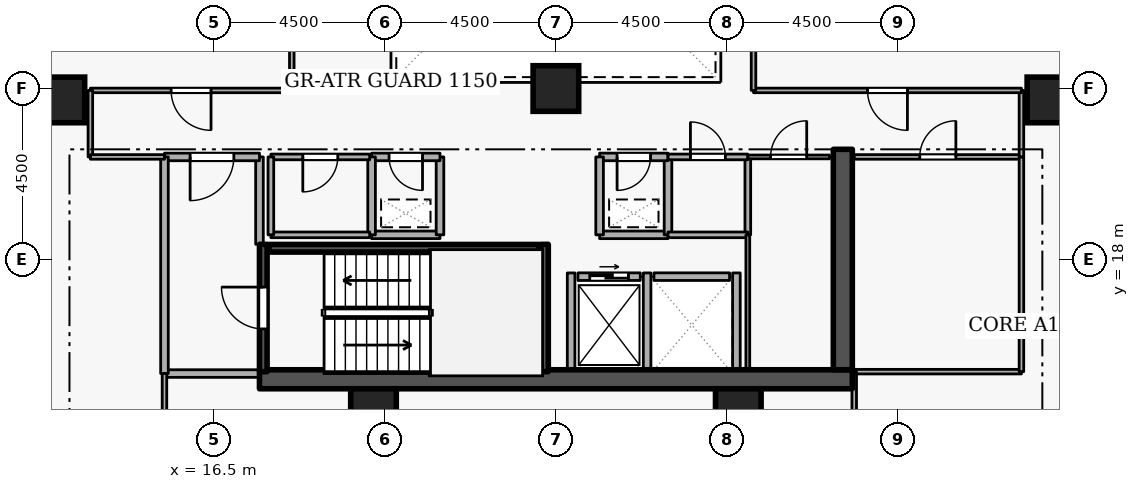
"""IFC4 building model, lengths in metres.
Left out: names, types, materials, properties, quantities, classifications, styles, units other than length and angle.
Written with IfcOpenShell. Run it as: python <this file> out.ifc"""

import sys

from ifc_helpers import new_model, si_unit, direction, frame, frame_2d, origin, origin_2d, place, context, subcontext, project, spatial, rectangle, extrude, element, fill, save


model = new_model("IFC4")
c1 = context("Model", 3, precision=1e-05, world=origin(), true_north=direction((0.0, 1.0)))
c2 = subcontext(c1, "Body", "Model", "MODEL_VIEW")
j1 = project(units=[si_unit("LENGTHUNIT", "METRE"), si_unit("PLANEANGLEUNIT", "RADIAN")], contexts=[c1])
p1 = place(None, origin())
s1 = spatial("IfcSite", under=j1, at=p1, CompositionType="ELEMENT")
p2 = place(p1, origin())
s2 = spatial("IfcBuilding", under=s1, at=p2, CompositionType="ELEMENT")
p3 = place(p2, frame((0.0, 0.0, 123.3)))
s3 = spatial("IfcBuildingStorey", under=s2, at=p3, CompositionType="ELEMENT", Elevation=123.3)
p4 = place(p3, frame((17.7, 14.85, 0.0), z_axis=(0.0, 0.0, 1.0), x_axis=(1.0, 0.0, 0.0)))
e1 = element("IfcWall", 1, at=p4, inside=s3, PredefinedType="SHEAR", context=c2, shape_type="SweptSolid", body=[
    extrude(rectangle(XDim=15.6, YDim=0.5, at=frame_2d((7.8, 0.0))), origin(), (0.0, 0.0, 1.0), 3.6),
])
p5 = place(p3, frame((33.05, 15.1, 0.0), z_axis=(0.0, 0.0, 1.0), x_axis=(0.0, 1.0, 0.0)))
e2 = element("IfcWall", 2, at=p5, inside=s3, PredefinedType="SHEAR", context=c2, shape_type="SweptSolid", body=[
    extrude(rectangle(XDim=5.8, YDim=0.5, at=frame_2d((2.9, 0.0))), origin(), (0.0, 0.0, 1.0), 3.6),
])
for number, where, z_axis, x_axis in (
    (3, (12.5, 22.2, 0.0), (0.0, 0.0, 1.0), (1.0, 0.0, 0.0)),
    (4, (38.5, 22.2, 0.0), (0.0, 0.0, 1.0), (1.0, 0.0, 0.0)),
    (5, (20.7, 14.0, 0.0), (0.0, 0.0, 1.0), (1.0, 0.0, 0.0)),
    (6, (30.3, 14.0, 0.0), (0.0, 0.0, 1.0), (1.0, 0.0, 0.0)),
    (7, (25.5, 22.5, 0.0), (0.0, 0.0, 1.0), (1.0, 0.0, 0.0)),
):
    element("IfcColumn", number, at=place(p3, frame(where, z_axis=z_axis, x_axis=x_axis)), inside=s3, PredefinedType="COLUMN", context=c2, shape_type="SweptSolid", body=[
        extrude(rectangle(XDim=1.2, YDim=1.2, at=origin_2d()), origin(), (0.0, 0.0, 1.0), 3.6),
    ])
p6 = place(p3, frame((26.08, 17.55, 0.0), z_axis=(0.0, 0.0, 1.0), x_axis=(1.0, 0.0, 0.0)))
e8 = element("IfcWall", 8, at=p6, inside=s3, PredefinedType="STANDARD", context=c2, shape_type="SweptSolid", body=[
    extrude(rectangle(XDim=1.64, YDim=0.2, at=frame_2d((0.82, 0.0))), origin(), (0.0, 0.0, 1.0), 3.34),
])
p7 = place(p6, frame((0.31, 0.0, 0.0)))
e9 = element("IfcOpeningElement", 9, at=p7, cuts=e8, PredefinedType="OPENING", context=c2, shape_type="SweptSolid", body=[
    extrude(rectangle(XDim=1.02, YDim=2.06, at=frame_2d((0.51, 1.03))), frame((0.0, 0.11, 0.0), z_axis=(0.0, -1.0, 0.0), x_axis=(1.0, 0.0, 0.0)), (0.0, 0.0, 1.0), 0.22),
])
p8 = place(p3, frame((28.08, 17.55, 0.0), z_axis=(0.0, 0.0, 1.0), x_axis=(1.0, 0.0, 0.0)))
e10 = element("IfcWall", 10, at=p8, inside=s3, PredefinedType="STANDARD", context=c2, shape_type="SweptSolid", body=[
    extrude(rectangle(XDim=1.99, YDim=0.2, at=frame_2d((0.995, 0.0))), origin(), (0.0, 0.0, 1.0), 3.34),
])
for number, where, z_axis, x_axis in (
    (11, (27.9, 15.112, 0.0), (0.0, 0.0, 1.0), (0.0, 1.0, 0.0)),
    (12, (25.9, 15.112, 0.0), (0.0, 0.0, 1.0), (0.0, 1.0, 0.0)),
    (13, (30.25, 15.112, 0.0), (0.0, 0.0, 1.0), (0.0, 1.0, 0.0)),
):
    element("IfcWall", number, at=place(p3, frame(where, z_axis=z_axis, x_axis=x_axis)), inside=s3, PredefinedType="STANDARD", context=c2, shape_type="SweptSolid", body=[
        extrude(rectangle(XDim=2.536, YDim=0.2, at=frame_2d((1.268, 0.0))), origin(), (0.0, 0.0, 1.0), 3.34),
    ])
p9 = place(p3, frame((17.8, 15.05, 0.0), z_axis=(0.0, 0.0, 1.0), x_axis=(0.0, 1.0, 0.0)))
e14 = element("IfcWall", 14, at=p9, inside=s3, PredefinedType="SHEAR", context=c2, shape_type="SweptSolid", body=[
    extrude(rectangle(XDim=3.35, YDim=0.2, at=frame_2d((1.675, 0.0))), origin(), (0.0, 0.0, 1.0), 3.6),
])
p10 = place(p9, frame((1.125, 0.0, 0.0)))
e15 = element("IfcOpeningElement", 15, at=p10, cuts=e14, PredefinedType="OPENING", context=c2, shape_type="SweptSolid", body=[
    extrude(rectangle(XDim=1.1, YDim=2.1, at=frame_2d((0.55, 1.05))), frame((0.0, 0.11, 0.0), z_axis=(0.0, -1.0, 0.0), x_axis=(1.0, 0.0, 0.0)), (0.0, 0.0, 1.0), 0.22),
])
p11 = place(p3, frame((25.2, 18.4, 0.0), z_axis=(0.0, 0.0, 1.0), x_axis=(0.0, -1.0, 0.0)))
e16 = element("IfcWall", 16, at=p11, inside=s3, PredefinedType="SHEAR", context=c2, shape_type="SweptSolid", body=[
    extrude(rectangle(XDim=3.35, YDim=0.2, at=frame_2d((1.675, 0.0))), origin(), (0.0, 0.0, 1.0), 3.6),
])
p12 = place(p3, frame((25.05, 18.297, 0.0), z_axis=(0.0, 0.0, 1.0), x_axis=(-1.0, 0.0, 0.0)))
e17 = element("IfcWall", 17, at=p12, inside=s3, PredefinedType="SHEAR", context=c2, shape_type="SweptSolid", body=[
    extrude(rectangle(XDim=7.1, YDim=0.2, at=frame_2d((3.55, 0.0))), origin(), (0.0, 0.0, 1.0), 3.6),
])
p13 = place(p3, frame((15.2, 15.0, 0.0), z_axis=(0.0, 0.0, 1.0), x_axis=(1.0, 0.0, 0.0)))
e18 = element("IfcWall", 18, at=p13, inside=s3, PredefinedType="STANDARD", context=c2, shape_type="SweptSolid", body=[
    extrude(rectangle(XDim=2.5, YDim=0.2, at=frame_2d((1.25, 0.0))), origin(), (0.0, 0.0, 1.0), 3.34),
])
p14 = place(p3, frame((17.7, 18.4, 0.0), z_axis=(0.0, 0.0, 1.0), x_axis=(0.0, 1.0, 0.0)))
e19 = element("IfcWall", 19, at=p14, inside=s3, PredefinedType="STANDARD", context=c2, shape_type="SweptSolid", body=[
    extrude(rectangle(XDim=2.3, YDim=0.2, at=frame_2d((1.15, 0.0))), origin(), (0.0, 0.0, 1.0), 2.545),
])
p15 = place(p3, frame((17.7, 20.7, 0.0), z_axis=(0.0, 0.0, 1.0), x_axis=(-1.0, 0.0, 0.0)))
e20 = element("IfcWall", 20, at=p15, inside=s3, PredefinedType="STANDARD", context=c2, shape_type="SweptSolid", body=[
    extrude(rectangle(XDim=2.5, YDim=0.2, at=frame_2d((1.25, 0.0))), origin(), (0.0, 0.0, 1.0), 3.34),
])
p16 = place(p15, frame((0.675, 0.0, 0.0)))
e21 = element("IfcOpeningElement", 21, at=p16, cuts=e20, PredefinedType="OPENING", context=c2, shape_type="SweptSolid", body=[
    extrude(rectangle(XDim=1.15, YDim=2.1, at=frame_2d((0.575, 1.05))), frame((0.0, 0.11, 0.0), z_axis=(0.0, -1.0, 0.0), x_axis=(1.0, 0.0, 0.0)), (0.0, 0.0, 1.0), 0.22),
])
p17 = place(p3, frame((15.2, 20.7, 0.0), z_axis=(0.0, 0.0, 1.0), x_axis=(0.0, -1.0, 0.0)))
e22 = element("IfcWall", 22, at=p17, inside=s3, PredefinedType="STANDARD", context=c2, shape_type="SweptSolid", body=[
    extrude(rectangle(XDim=5.7, YDim=0.2, at=frame_2d((2.85, 0.0))), origin(), (0.0, 0.0, 1.0), 3.34),
])
p18 = place(p3, frame((26.65, 18.65, 0.0), z_axis=(0.0, 0.0, 1.0), x_axis=(1.0, 0.0, 0.0)))
e23 = element("IfcWall", 23, at=p18, inside=s3, PredefinedType="STANDARD", context=c2, shape_type="SweptSolid", body=[
    extrude(rectangle(XDim=1.8, YDim=0.2, at=frame_2d((0.9, 0.0))), origin(), (0.0, 0.0, 1.0), 3.34),
])
p19 = place(p3, frame((28.45, 18.65, 0.0), z_axis=(0.0, 0.0, 1.0), x_axis=(0.0, 1.0, 0.0)))
e24 = element("IfcWall", 24, at=p19, inside=s3, PredefinedType="STANDARD", context=c2, shape_type="SweptSolid", body=[
    extrude(rectangle(XDim=2.05, YDim=0.2, at=frame_2d((1.025, 0.0))), origin(), (0.0, 0.0, 1.0), 3.34),
])
p20 = place(p3, frame((28.45, 20.7, 0.0), z_axis=(0.0, 0.0, 1.0), x_axis=(-1.0, 0.0, 0.0)))
e25 = element("IfcWall", 25, at=p20, inside=s3, PredefinedType="STANDARD", context=c2, shape_type="SweptSolid", body=[
    extrude(rectangle(XDim=1.8, YDim=0.2, at=frame_2d((0.9, 0.0))), origin(), (0.0, 0.0, 1.0), 3.34),
])
p21 = place(p20, frame((0.46, 0.0, 0.0)))
e26 = element("IfcOpeningElement", 26, at=p21, cuts=e25, PredefinedType="OPENING", context=c2, shape_type="SweptSolid", body=[
    extrude(rectangle(XDim=0.88, YDim=2.04, at=frame_2d((0.44, 1.02))), frame((0.0, 0.11, 0.0), z_axis=(0.0, -1.0, 0.0), x_axis=(1.0, 0.0, 0.0)), (0.0, 0.0, 1.0), 0.22),
])
p22 = place(p3, frame((26.65, 20.7, 0.0), z_axis=(0.0, 0.0, 1.0), x_axis=(0.0, -1.0, 0.0)))
e27 = element("IfcWall", 27, at=p22, inside=s3, PredefinedType="STANDARD", context=c2, shape_type="SweptSolid", body=[
    extrude(rectangle(XDim=2.05, YDim=0.2, at=frame_2d((1.025, 0.0))), origin(), (0.0, 0.0, 1.0), 3.34),
])
p23 = place(p3, frame((20.65, 18.65, 0.0), z_axis=(0.0, 0.0, 1.0), x_axis=(1.0, 0.0, 0.0)))
e28 = element("IfcWall", 28, at=p23, inside=s3, PredefinedType="STANDARD", context=c2, shape_type="SweptSolid", body=[
    extrude(rectangle(XDim=1.8, YDim=0.2, at=frame_2d((0.9, 0.0))), origin(), (0.0, 0.0, 1.0), 3.34),
])
p24 = place(p3, frame((22.45, 18.65, 0.0), z_axis=(0.0, 0.0, 1.0), x_axis=(0.0, 1.0, 0.0)))
e29 = element("IfcWall", 29, at=p24, inside=s3, PredefinedType="STANDARD", context=c2, shape_type="SweptSolid", body=[
    extrude(rectangle(XDim=2.05, YDim=0.2, at=frame_2d((1.025, 0.0))), origin(), (0.0, 0.0, 1.0), 3.34),
])
p25 = place(p3, frame((22.45, 20.7, 0.0), z_axis=(0.0, 0.0, 1.0), x_axis=(-1.0, 0.0, 0.0)))
e30 = element("IfcWall", 30, at=p25, inside=s3, PredefinedType="STANDARD", context=c2, shape_type="SweptSolid", body=[
    extrude(rectangle(XDim=1.8, YDim=0.2, at=frame_2d((0.9, 0.0))), origin(), (0.0, 0.0, 1.0), 3.34),
])
p26 = place(p25, frame((0.46, 0.0, 0.0)))
e31 = element("IfcOpeningElement", 31, at=p26, cuts=e30, PredefinedType="OPENING", context=c2, shape_type="SweptSolid", body=[
    extrude(rectangle(XDim=0.88, YDim=2.04, at=frame_2d((0.44, 1.02))), frame((0.0, 0.11, 0.0), z_axis=(0.0, -1.0, 0.0), x_axis=(1.0, 0.0, 0.0)), (0.0, 0.0, 1.0), 0.22),
])
p27 = place(p3, frame((20.65, 20.7, 0.0), z_axis=(0.0, 0.0, 1.0), x_axis=(0.0, -1.0, 0.0)))
e32 = element("IfcWall", 32, at=p27, inside=s3, PredefinedType="STANDARD", context=c2, shape_type="SweptSolid", body=[
    extrude(rectangle(XDim=2.05, YDim=0.2, at=frame_2d((1.025, 0.0))), origin(), (0.0, 0.0, 1.0), 3.34),
])
p28 = place(p3, frame((18.0, 18.65, 0.0), z_axis=(0.0, 0.0, 1.0), x_axis=(1.0, 0.0, 0.0)))
e33 = element("IfcWall", 33, at=p28, inside=s3, PredefinedType="PARTITIONING", context=c2, shape_type="SweptSolid", body=[
    extrude(rectangle(XDim=2.6, YDim=0.15, at=frame_2d((1.3, 0.0))), origin(), (0.0, 0.0, 1.0), 3.34),
])
p29 = place(p3, frame((20.6, 20.7, 0.0), z_axis=(0.0, 0.0, 1.0), x_axis=(-1.0, 0.0, 0.0)))
e34 = element("IfcWall", 34, at=p29, inside=s3, PredefinedType="PARTITIONING", context=c2, shape_type="SweptSolid", body=[
    extrude(rectangle(XDim=2.6, YDim=0.15, at=frame_2d((1.3, 0.0))), origin(), (0.0, 0.0, 1.0), 3.34),
])
p30 = place(p29, frame((0.84, 0.0, 0.0)))
e35 = element("IfcOpeningElement", 35, at=p30, cuts=e34, PredefinedType="OPENING", context=c2, shape_type="SweptSolid", body=[
    extrude(rectangle(XDim=0.92, YDim=2.08, at=frame_2d((0.46, 1.04))), frame((0.0, 0.085, 0.0), z_axis=(0.0, -1.0, 0.0), x_axis=(1.0, 0.0, 0.0)), (0.0, 0.0, 1.0), 0.17),
])
p31 = place(p3, frame((18.0, 20.7, 0.0), z_axis=(0.0, 0.0, 1.0), x_axis=(0.0, -1.0, 0.0)))
e36 = element("IfcWall", 36, at=p31, inside=s3, PredefinedType="PARTITIONING", context=c2, shape_type="SweptSolid", body=[
    extrude(rectangle(XDim=2.05, YDim=0.15, at=frame_2d((1.025, 0.0))), origin(), (0.0, 0.0, 1.0), 2.545),
])
p32 = place(p3, frame((30.55, 20.7, 0.0), z_axis=(0.0, 0.0, 1.0), x_axis=(0.0, -1.0, 0.0)))
e37 = element("IfcWall", 37, at=p32, inside=s3, PredefinedType="PARTITIONING", context=c2, shape_type="SweptSolid", body=[
    extrude(rectangle(XDim=2.05, YDim=0.15, at=frame_2d((1.025, 0.0))), origin(), (0.0, 0.0, 1.0), 3.34),
])
p33 = place(p3, frame((30.55, 18.65, 0.0), z_axis=(0.0, 0.0, 1.0), x_axis=(-1.0, 0.0, 0.0)))
e38 = element("IfcWall", 38, at=p33, inside=s3, PredefinedType="PARTITIONING", context=c2, shape_type="SweptSolid", body=[
    extrude(rectangle(XDim=2.1, YDim=0.15, at=frame_2d((1.05, 0.0))), origin(), (0.0, 0.0, 1.0), 3.34),
])
p34 = place(p3, frame((28.45, 20.7, 0.0), z_axis=(0.0, 0.0, 1.0), x_axis=(1.0, 0.0, 0.0)))
e39 = element("IfcWall", 39, at=p34, inside=s3, PredefinedType="PARTITIONING", context=c2, shape_type="SweptSolid", body=[
    extrude(rectangle(XDim=2.1, YDim=0.15, at=frame_2d((1.05, 0.0))), origin(), (0.0, 0.0, 1.0), 3.34),
])
p35 = place(p34, frame((0.59, 0.0, 0.0)))
e40 = element("IfcOpeningElement", 40, at=p35, cuts=e39, PredefinedType="OPENING", context=c2, shape_type="SweptSolid", body=[
    extrude(rectangle(XDim=0.92, YDim=2.08, at=frame_2d((0.46, 1.04))), frame((0.0, 0.085, 0.0), z_axis=(0.0, -1.0, 0.0), x_axis=(1.0, 0.0, 0.0)), (0.0, 0.0, 1.0), 0.17),
])
p36 = place(p3, frame((30.55, 15.1, 0.0), z_axis=(0.0, 0.0, 1.0), x_axis=(0.0, 1.0, 0.0)))
e41 = element("IfcWall", 41, at=p36, inside=s3, PredefinedType="PARTITIONING", context=c2, shape_type="SweptSolid", body=[
    extrude(rectangle(XDim=3.55, YDim=0.1, at=frame_2d((1.775, 0.0))), origin(), (0.0, 0.0, 1.0), 3.34),
])
p37 = place(p3, frame((30.55, 20.7, 0.0), z_axis=(0.0, 0.0, 1.0), x_axis=(1.0, 0.0, 0.0)))
e42 = element("IfcWall", 42, at=p37, inside=s3, PredefinedType="PARTITIONING", context=c2, shape_type="SweptSolid", body=[
    extrude(rectangle(XDim=2.15, YDim=0.1, at=frame_2d((1.075, 0.0))), origin(), (0.0, 0.0, 1.0), 3.34),
])
p38 = place(p37, frame((0.6, 0.0, 0.0)))
e43 = element("IfcOpeningElement", 43, at=p38, cuts=e42, PredefinedType="OPENING", context=c2, shape_type="SweptSolid", body=[
    extrude(rectangle(XDim=0.95, YDim=2.1, at=frame_2d((0.475, 1.05))), frame((0.0, 0.06, 0.0), z_axis=(0.0, -1.0, 0.0), x_axis=(1.0, 0.0, 0.0)), (0.0, 0.0, 1.0), 0.12),
])
p39 = place(p3, frame((37.75, 15.05, 0.0), z_axis=(0.0, 0.0, 1.0), x_axis=(-1.0, 0.0, 0.0)))
e44 = element("IfcWall", 44, at=p39, inside=s3, PredefinedType="PARTITIONING", context=c2, shape_type="SweptSolid", body=[
    extrude(rectangle(XDim=4.4, YDim=0.12, at=frame_2d((2.2, 0.0))), origin(), (0.0, 0.0, 1.0), 3.34),
])
p40 = place(p3, frame((33.35, 20.7, 0.0), z_axis=(0.0, 0.0, 1.0), x_axis=(1.0, 0.0, 0.0)))
e45 = element("IfcWall", 45, at=p40, inside=s3, PredefinedType="PARTITIONING", context=c2, shape_type="SweptSolid", body=[
    extrude(rectangle(XDim=4.4, YDim=0.12, at=frame_2d((2.2, 0.0))), origin(), (0.0, 0.0, 1.0), 3.34),
])
p41 = place(p40, frame((1.725, 0.0, 0.0)))
e46 = element("IfcOpeningElement", 46, at=p41, cuts=e45, PredefinedType="OPENING", context=c2, shape_type="SweptSolid", body=[
    extrude(rectangle(XDim=0.95, YDim=2.1, at=frame_2d((0.475, 1.05))), frame((0.0, 0.07, 0.0), z_axis=(0.0, -1.0, 0.0), x_axis=(1.0, 0.0, 0.0)), (0.0, 0.0, 1.0), 0.14),
])
p42 = place(p3, frame((37.75, 20.7, 0.0), z_axis=(0.0, 0.0, 1.0), x_axis=(0.0, -1.0, 0.0)))
e47 = element("IfcWall", 47, at=p42, inside=s3, PredefinedType="PARTITIONING", context=c2, shape_type="SweptSolid", body=[
    extrude(rectangle(XDim=5.65, YDim=0.12, at=frame_2d((2.825, 0.0))), origin(), (0.0, 0.0, 1.0), 3.34),
])
p43 = place(p3, frame((18.55, 22.45, 0.0), z_axis=(0.0, 0.0, 1.0), x_axis=(-1.0, 0.0, 0.0)))
e48 = element("IfcWall", 48, at=p43, inside=s3, PredefinedType="PARTITIONING", context=c2, shape_type="SweptSolid", body=[
    extrude(rectangle(XDim=5.3, YDim=0.12, at=frame_2d((2.65, 0.0))), origin(), (0.0, 0.0, 1.0), 3.34),
])
p44 = place(p43, frame((2.125, 0.0, 0.0)))
e49 = element("IfcOpeningElement", 49, at=p44, cuts=e48, PredefinedType="OPENING", context=c2, shape_type="SweptSolid", body=[
    extrude(rectangle(XDim=1.05, YDim=2.1, at=frame_2d((0.525, 1.05))), frame((0.0, 0.07, 0.0), z_axis=(0.0, -1.0, 0.0), x_axis=(1.0, 0.0, 0.0)), (0.0, 0.0, 1.0), 0.14),
])
p45 = place(p3, frame((13.25, 22.45, 0.0), z_axis=(0.0, 0.0, 1.0), x_axis=(0.0, -1.0, 0.0)))
e50 = element("IfcWall", 50, at=p45, inside=s3, PredefinedType="PARTITIONING", context=c2, shape_type="SweptSolid", body=[
    extrude(rectangle(XDim=1.75, YDim=0.12, at=frame_2d((0.875, 0.0))), origin(), (0.0, 0.0, 1.0), 3.34),
])
p46 = place(p3, frame((13.25, 20.7, 0.0), z_axis=(0.0, 0.0, 1.0), x_axis=(1.0, 0.0, 0.0)))
e51 = element("IfcWall", 51, at=p46, inside=s3, PredefinedType="PARTITIONING", context=c2, shape_type="SweptSolid", body=[
    extrude(rectangle(XDim=1.95, YDim=0.12, at=frame_2d((0.975, 0.0))), origin(), (0.0, 0.0, 1.0), 3.34),
])
p47 = place(p3, frame((15.2, 15.0, 0.0), z_axis=(0.0, 0.0, 1.0), x_axis=(0.0, -1.0, 0.0)))
e52 = element("IfcWall", 52, at=p47, inside=s3, PredefinedType="PARTITIONING", context=c2, shape_type="SweptSolid", body=[
    extrude(rectangle(XDim=11.72, YDim=0.12, at=frame_2d((5.86, 0.0))), origin(), (0.0, 0.0, 1.0), 3.34),
])
p48 = place(p3, frame((18.55, 27.0, 0.0), z_axis=(0.0, 0.0, 1.0), x_axis=(0.0, -1.0, 0.0)))
e53 = element("IfcWall", 53, at=p48, inside=s3, PredefinedType="PARTITIONING", context=c2, shape_type="SweptSolid", body=[
    extrude(rectangle(XDim=4.55, YDim=0.12, at=frame_2d((2.275, 0.0))), origin(), (0.0, 0.0, 1.0), 3.34),
])
p49 = place(p3, frame((33.35, 3.28, 0.0), z_axis=(0.0, 0.0, 1.0), x_axis=(0.0, 1.0, 0.0)))
e54 = element("IfcWall", 54, at=p49, inside=s3, PredefinedType="PARTITIONING", context=c2, shape_type="SweptSolid", body=[
    extrude(rectangle(XDim=11.77, YDim=0.12, at=frame_2d((5.885, 0.0))), origin(), (0.0, 0.0, 1.0), 2.545),
])
p50 = place(p3, frame((37.75, 20.7, 0.0), z_axis=(0.0, 0.0, 1.0), x_axis=(0.0, 1.0, 0.0)))
e55 = element("IfcWall", 55, at=p50, inside=s3, PredefinedType="PARTITIONING", context=c2, shape_type="SweptSolid", body=[
    extrude(rectangle(XDim=1.75, YDim=0.12, at=frame_2d((0.875, 0.0))), origin(), (0.0, 0.0, 1.0), 3.34),
])
p51 = place(p3, frame((37.75, 22.45, 0.0), z_axis=(0.0, 0.0, 1.0), x_axis=(-1.0, 0.0, 0.0)))
e56 = element("IfcWall", 56, at=p51, inside=s3, PredefinedType="PARTITIONING", context=c2, shape_type="SweptSolid", body=[
    extrude(rectangle(XDim=7.05, YDim=0.12, at=frame_2d((3.525, 0.0))), origin(), (0.0, 0.0, 1.0), 3.34),
])
p52 = place(p51, frame((3.0, 0.0, 0.0)))
e57 = element("IfcOpeningElement", 57, at=p52, cuts=e56, PredefinedType="OPENING", context=c2, shape_type="SweptSolid", body=[
    extrude(rectangle(XDim=1.05, YDim=2.1, at=frame_2d((0.525, 1.05))), frame((0.0, 0.07, 0.0), z_axis=(0.0, -1.0, 0.0), x_axis=(1.0, 0.0, 0.0)), (0.0, 0.0, 1.0), 0.14),
])
p53 = place(p3, frame((30.7, 22.45, 0.0), z_axis=(0.0, 0.0, 1.0), x_axis=(0.0, 1.0, 0.0)))
e58 = element("IfcWall", 58, at=p53, inside=s3, PredefinedType="PARTITIONING", context=c2, shape_type="SweptSolid", body=[
    extrude(rectangle(XDim=4.55, YDim=0.12, at=frame_2d((2.275, 0.0))), origin(), (0.0, 0.0, 1.0), 3.34),
])
p54 = place(p7, origin())
e59 = element("IfcDoor", 59, at=p54, inside=s3, OperationType="SLIDING_TO_LEFT", PredefinedType="DOOR", context=c2, shape_type="SweptSolid", body=[
    extrude(rectangle(XDim=1.02, YDim=2.06, at=frame_2d((0.51, 1.03))), frame((0.0, 0.025, 0.0), z_axis=(0.0, -1.0, 0.0), x_axis=(1.0, 0.0, 0.0)), (0.0, 0.0, 1.0), 0.05),
])
fill(e9, e59)
p55 = place(p10, origin())
e60 = element("IfcDoor", 60, at=p55, inside=s3, OperationType="SINGLE_SWING_RIGHT", PredefinedType="DOOR", context=c2, shape_type="SweptSolid", body=[
    extrude(rectangle(XDim=1.1, YDim=2.1, at=frame_2d((0.55, 1.05))), frame((0.0, 0.025, 0.0), z_axis=(0.0, -1.0, 0.0), x_axis=(1.0, 0.0, 0.0)), (0.0, 0.0, 1.0), 0.05),
])
fill(e15, e60)
p56 = place(p16, origin())
e61 = element("IfcDoor", 61, at=p56, inside=s3, OperationType="SINGLE_SWING_RIGHT", PredefinedType="DOOR", context=c2, shape_type="SweptSolid", body=[
    extrude(rectangle(XDim=1.15, YDim=2.1, at=frame_2d((0.575, 1.05))), frame((0.0, 0.025, 0.0), z_axis=(0.0, -1.0, 0.0), x_axis=(1.0, 0.0, 0.0)), (0.0, 0.0, 1.0), 0.05),
])
fill(e21, e61)
p57 = place(p21, origin())
e62 = element("IfcDoor", 62, at=p57, inside=s3, OperationType="SINGLE_SWING_RIGHT", PredefinedType="DOOR", context=c2, shape_type="SweptSolid", body=[
    extrude(rectangle(XDim=0.88, YDim=2.04, at=frame_2d((0.44, 1.02))), frame((0.0, 0.025, 0.0), z_axis=(0.0, -1.0, 0.0), x_axis=(1.0, 0.0, 0.0)), (0.0, 0.0, 1.0), 0.05),
])
fill(e26, e62)
p58 = place(p26, origin())
e63 = element("IfcDoor", 63, at=p58, inside=s3, OperationType="SINGLE_SWING_LEFT", PredefinedType="DOOR", context=c2, shape_type="SweptSolid", body=[
    extrude(rectangle(XDim=0.88, YDim=2.04, at=frame_2d((0.44, 1.02))), frame((0.0, 0.025, 0.0), z_axis=(0.0, -1.0, 0.0), x_axis=(1.0, 0.0, 0.0)), (0.0, 0.0, 1.0), 0.05),
])
fill(e31, e63)
p59 = place(p30, origin())
e64 = element("IfcDoor", 64, at=p59, inside=s3, OperationType="SINGLE_SWING_RIGHT", PredefinedType="DOOR", context=c2, shape_type="SweptSolid", body=[
    extrude(rectangle(XDim=0.92, YDim=2.08, at=frame_2d((0.46, 1.04))), frame((0.0, 0.025, 0.0), z_axis=(0.0, -1.0, 0.0), x_axis=(1.0, 0.0, 0.0)), (0.0, 0.0, 1.0), 0.05),
])
fill(e35, e64)
p60 = place(p35, origin())
e65 = element("IfcDoor", 65, at=p60, inside=s3, OperationType="SINGLE_SWING_LEFT", PredefinedType="DOOR", context=c2, shape_type="SweptSolid", body=[
    extrude(rectangle(XDim=0.92, YDim=2.08, at=frame_2d((0.46, 1.04))), frame((0.0, 0.025, 0.0), z_axis=(0.0, -1.0, 0.0), x_axis=(1.0, 0.0, 0.0)), (0.0, 0.0, 1.0), 0.05),
])
fill(e40, e65)
p61 = place(p38, origin())
e66 = element("IfcDoor", 66, at=p61, inside=s3, OperationType="SINGLE_SWING_RIGHT", PredefinedType="DOOR", context=c2, shape_type="SweptSolid", body=[
    extrude(rectangle(XDim=0.95, YDim=2.1, at=frame_2d((0.475, 1.05))), frame((0.0, 0.025, 0.0), z_axis=(0.0, -1.0, 0.0), x_axis=(1.0, 0.0, 0.0)), (0.0, 0.0, 1.0), 0.05),
])
fill(e43, e66)
p62 = place(p41, origin())
e67 = element("IfcDoor", 67, at=p62, inside=s3, OperationType="SINGLE_SWING_RIGHT", PredefinedType="DOOR", context=c2, shape_type="SweptSolid", body=[
    extrude(rectangle(XDim=0.95, YDim=2.1, at=frame_2d((0.475, 1.05))), frame((0.0, 0.025, 0.0), z_axis=(0.0, -1.0, 0.0), x_axis=(1.0, 0.0, 0.0)), (0.0, 0.0, 1.0), 0.05),
])
fill(e46, e67)
p63 = place(p44, origin())
e68 = element("IfcDoor", 68, at=p63, inside=s3, OperationType="SINGLE_SWING_LEFT", PredefinedType="DOOR", context=c2, shape_type="SweptSolid", body=[
    extrude(rectangle(XDim=1.05, YDim=2.1, at=frame_2d((0.525, 1.05))), frame((0.0, 0.025, 0.0), z_axis=(0.0, -1.0, 0.0), x_axis=(1.0, 0.0, 0.0)), (0.0, 0.0, 1.0), 0.05),
])
fill(e49, e68)
p64 = place(p52, origin())
e69 = element("IfcDoor", 69, at=p64, inside=s3, OperationType="SINGLE_SWING_LEFT", PredefinedType="DOOR", context=c2, shape_type="SweptSolid", body=[
    extrude(rectangle(XDim=1.05, YDim=2.1, at=frame_2d((0.525, 1.05))), frame((0.0, 0.025, 0.0), z_axis=(0.0, -1.0, 0.0), x_axis=(1.0, 0.0, 0.0)), (0.0, 0.0, 1.0), 0.05),
])
fill(e57, e69)
save(model, sys.argv[1])
